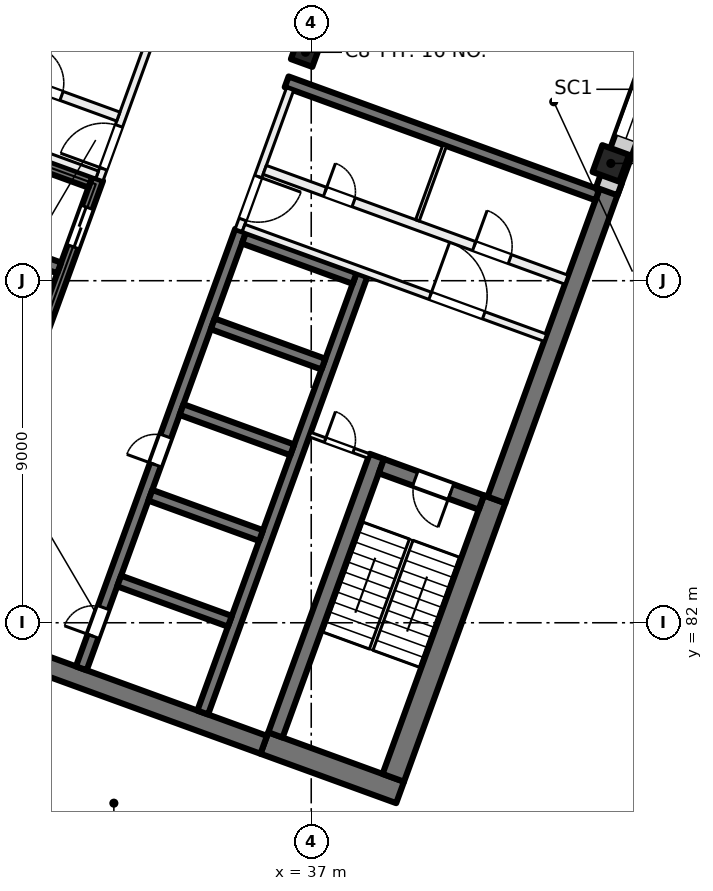
"""IFC4 building model, lengths in metres.
Left out: names, types, materials, properties, quantities, classifications, styles, units other than length and angle.
Written with IfcOpenShell. Run it as: python <this file> out.ifc"""

import sys

from ifc_helpers import new_model, si_unit, direction, frame, frame_2d, origin, origin_2d, place, context, subcontext, project, spatial, rectangle, extrude, element, fill, save


model = new_model("IFC4")
c1 = context("Model", 3, precision=1e-05, world=origin(), true_north=direction((0.0, 1.0)))
c2 = subcontext(c1, "Body", "Model", "MODEL_VIEW")
j1 = project(units=[si_unit("LENGTHUNIT", "METRE"), si_unit("PLANEANGLEUNIT", "RADIAN")], contexts=[c1])
p1 = place(None, origin())
s1 = spatial("IfcSite", under=j1, at=p1, CompositionType="ELEMENT")
p2 = place(p1, origin())
s2 = spatial("IfcBuilding", under=s1, at=p2, CompositionType="ELEMENT")
p3 = place(p2, frame((0.0, 0.0, 188.0)))
s3 = spatial("IfcBuildingStorey", under=s2, at=p3, CompositionType="ELEMENT", Elevation=188.0)
p4 = place(p3, frame((36.849, 97.011, 0.0), z_axis=(0.0, 0.0, 1.0), x_axis=(-0.342020143326, -0.939692620786, 0.0)))
e1 = element("IfcColumn", 1, at=p4, inside=s3, PredefinedType="COLUMN", context=c2, shape_type="SweptSolid", body=[
    extrude(rectangle(XDim=0.6, YDim=0.6, at=origin_2d()), origin(), (0.0, 0.0, 1.0), 4.0),
])
p5 = place(p3, frame((44.884, 94.087, 0.0), z_axis=(0.0, 0.0, 1.0), x_axis=(-0.342020143326, -0.939692620786, 0.0)))
e2 = element("IfcColumn", 2, at=p5, inside=s3, PredefinedType="COLUMN", context=c2, shape_type="SweptSolid", body=[
    extrude(rectangle(XDim=0.75, YDim=0.75, at=origin_2d()), origin(), (0.0, 0.0, 1.0), 4.0),
])
p6 = place(p3, frame((39.338, 77.535, 0.0), z_axis=(0.0, 0.0, 1.0), x_axis=(-0.939701471648, 0.341995824804, 0.0)))
e3 = element("IfcWall", 3, at=p6, inside=s3, PredefinedType="SHEAR", context=c2, shape_type="SweptSolid", body=[
    extrude(rectangle(XDim=3.8, YDim=0.6, at=frame_2d((1.9, 0.0))), origin(), (0.0, 0.0, 1.0), 4.0),
])
p7 = place(p3, frame((35.75, 78.788, 0.0), z_axis=(0.0, 0.0, 1.0), x_axis=(-0.939692894512, 0.342019391267, 0.0)))
e4 = element("IfcWall", 4, at=p7, inside=s3, PredefinedType="SHEAR", context=c2, shape_type="SweptSolid", body=[
    extrude(rectangle(XDim=14.4, YDim=0.5, at=frame_2d((7.2, 0.0))), origin(), (0.0, 0.0, 1.0), 4.0),
])
p8 = place(p3, frame((39.159, 77.92, 0.0), z_axis=(0.0, 0.0, 1.0), x_axis=(0.342016982193, 0.939693771338, 0.0)))
e5 = element("IfcWall", 5, at=p8, inside=s3, PredefinedType="SHEAR", context=c2, shape_type="SweptSolid", body=[
    extrude(rectangle(XDim=7.8, YDim=0.6, at=frame_2d((3.9, 0.0))), origin(), (0.0, 0.0, 1.0), 4.0),
])
p9 = place(p3, frame((41.874, 85.232, 0.0), z_axis=(0.0, 0.0, 1.0), x_axis=(0.342020437038, 0.939692513883, 0.0)))
e6 = element("IfcWall", 6, at=p9, inside=s3, PredefinedType="SHEAR", context=c2, shape_type="SweptSolid", body=[
    extrude(rectangle(XDim=8.975, YDim=0.5, at=frame_2d((4.487, 0.0))), origin(), (0.0, 0.0, 1.0), 4.0),
])
p10 = place(p3, frame((36.058, 79.048, 0.0), z_axis=(0.0, 0.0, 1.0), x_axis=(0.342016982193, 0.939693771338, 0.0)))
e7 = element("IfcWall", 7, at=p10, inside=s3, PredefinedType="SHEAR", context=c2, shape_type="SweptSolid", body=[
    extrude(rectangle(XDim=7.8, YDim=0.4, at=frame_2d((3.9, 0.0))), origin(), (0.0, 0.0, 1.0), 4.0),
])
p11 = place(p3, frame((41.476, 85.164, 0.0), z_axis=(0.0, 0.0, 1.0), x_axis=(-0.939678810556, 0.342058084236, 0.0)))
e8 = element("IfcWall", 8, at=p11, inside=s3, PredefinedType="SHEAR", context=c2, shape_type="SweptSolid", body=[
    extrude(rectangle(XDim=2.8, YDim=0.4, at=frame_2d((1.4, 0.0))), origin(), (0.0, 0.0, 1.0), 4.0),
])
p12 = place(p11, frame((0.85, 0.0, 0.0)))
e9 = element("IfcOpeningElement", 9, at=p12, cuts=e8, PredefinedType="OPENING", context=c2, shape_type="SweptSolid", body=[
    extrude(rectangle(XDim=1.0, YDim=2.1, at=frame_2d((0.5, 1.05))), frame((0.0, 0.21, 0.0), z_axis=(0.0, -1.0, 0.0), x_axis=(1.0, 0.0, 0.0)), (0.0, 0.0, 1.0), 0.42),
])
p13 = place(p3, frame((30.949, 80.801, 0.0), z_axis=(0.0, 0.0, 1.0), x_axis=(0.342016684409, 0.939693879721, 0.0)))
e10 = element("IfcWall", 10, at=p13, inside=s3, PredefinedType="SHEAR", context=c2, shape_type="SweptSolid", body=[
    extrude(rectangle(XDim=12.25, YDim=0.3, at=frame_2d((6.125, 0.0))), origin(), (0.0, 0.0, 1.0), 4.0),
])
p14 = place(p13, frame((0.9, 0.0, 0.0)))
e11 = element("IfcOpeningElement", 11, at=p14, cuts=e10, PredefinedType="OPENING", context=c2, shape_type="SweptSolid", body=[
    extrude(rectangle(XDim=0.8, YDim=2.1, at=frame_2d((0.4, 1.05))), frame((0.0, 0.16, 0.0), z_axis=(0.0, -1.0, 0.0), x_axis=(1.0, 0.0, 0.0)), (0.0, 0.0, 1.0), 0.32),
])
p15 = place(p13, frame((5.7, 0.0, 0.0)))
e12 = element("IfcOpeningElement", 12, at=p15, cuts=e10, PredefinedType="OPENING", context=c2, shape_type="SweptSolid", body=[
    extrude(rectangle(XDim=0.8, YDim=2.1, at=frame_2d((0.4, 1.05))), frame((0.0, 0.16, 0.0), z_axis=(0.0, -1.0, 0.0), x_axis=(1.0, 0.0, 0.0)), (0.0, 0.0, 1.0), 0.32),
])
p16 = place(p3, frame((34.144, 79.638, 0.0), z_axis=(0.0, 0.0, 1.0), x_axis=(0.342016684409, 0.939693879721, 0.0)))
e13 = element("IfcWall", 13, at=p16, inside=s3, PredefinedType="SHEAR", context=c2, shape_type="SweptSolid", body=[
    extrude(rectangle(XDim=12.25, YDim=0.3, at=frame_2d((6.125, 0.0))), origin(), (0.0, 0.0, 1.0), 4.0),
])
p17 = place(p3, frame((34.858, 82.039, 0.0), z_axis=(0.0, 0.0, 1.0), x_axis=(-0.939689908313, 0.342027595692, 0.0)))
e14 = element("IfcWall", 14, at=p17, inside=s3, PredefinedType="SHEAR", context=c2, shape_type="SweptSolid", body=[
    extrude(rectangle(XDim=3.1, YDim=0.3, at=frame_2d((1.55, 0.0))), origin(), (0.0, 0.0, 1.0), 4.0),
])
p18 = place(p3, frame((35.679, 84.294, 0.0), z_axis=(0.0, 0.0, 1.0), x_axis=(-0.939706007505, 0.341983361377, 0.0)))
e15 = element("IfcWall", 15, at=p18, inside=s3, PredefinedType="SHEAR", context=c2, shape_type="SweptSolid", body=[
    extrude(rectangle(XDim=3.1, YDim=0.3, at=frame_2d((1.55, 0.0))), origin(), (0.0, 0.0, 1.0), 4.0),
])
for number, where, z_axis, x_axis in (
    (16, (36.5, 86.549, 0.0), (0.0, 0.0, 1.0), (-0.94, 0.342, 0.0)),
    (17, (37.321, 88.805, 0.0), (0.0, 0.0, 1.0), (-0.94, 0.342, 0.0)),
    (18, (38.142, 91.06, 0.0), (0.0, 0.0, 1.0), (-0.94, 0.342, 0.0)),
):
    element("IfcWall", number, at=place(p3, frame(where, z_axis=z_axis, x_axis=x_axis)), inside=s3, PredefinedType="SHEAR", context=c2, shape_type="SweptSolid", body=[
        extrude(rectangle(XDim=3.1, YDim=0.3, at=frame_2d((1.55, 0.0))), origin(), (0.0, 0.0, 1.0), 4.0),
    ])
p19 = place(p3, frame((27.191, 82.169, 0.0), z_axis=(0.0, 0.0, 1.0), x_axis=(0.342016684409, 0.939693879721, 0.0)))
e19 = element("IfcWall", 19, at=p19, inside=s3, PredefinedType="SHEAR", context=c2, shape_type="SweptSolid", body=[
    extrude(rectangle(XDim=12.25, YDim=0.3, at=frame_2d((6.125, 0.0))), origin(), (0.0, 0.0, 1.0), 4.0),
])
p20 = place(p19, frame((0.75, 0.0, 0.0)))
e20 = element("IfcOpeningElement", 20, at=p20, cuts=e19, PredefinedType="OPENING", context=c2, shape_type="SweptSolid", body=[
    extrude(rectangle(XDim=1.1, YDim=2.1, at=frame_2d((0.55, 1.05))), frame((0.0, 0.16, 0.0), z_axis=(0.0, -1.0, 0.0), x_axis=(1.0, 0.0, 0.0)), (0.0, 0.0, 1.0), 0.32),
])
p21 = place(p19, frame((3.15, 0.0, 0.0)))
e21 = element("IfcOpeningElement", 21, at=p21, cuts=e19, PredefinedType="OPENING", context=c2, shape_type="SweptSolid", body=[
    extrude(rectangle(XDim=1.1, YDim=2.1, at=frame_2d((0.55, 1.05))), frame((0.0, 0.16, 0.0), z_axis=(0.0, -1.0, 0.0), x_axis=(1.0, 0.0, 0.0)), (0.0, 0.0, 1.0), 0.32),
])
p22 = place(p19, frame((5.55, 0.0, 0.0)))
e22 = element("IfcOpeningElement", 22, at=p22, cuts=e19, PredefinedType="OPENING", context=c2, shape_type="SweptSolid", body=[
    extrude(rectangle(XDim=1.1, YDim=2.1, at=frame_2d((0.55, 1.05))), frame((0.0, 0.16, 0.0), z_axis=(0.0, -1.0, 0.0), x_axis=(1.0, 0.0, 0.0)), (0.0, 0.0, 1.0), 0.32),
])
p23 = place(p19, frame((10.35, 0.0, 0.0)))
e23 = element("IfcOpeningElement", 23, at=p23, cuts=e19, PredefinedType="OPENING", context=c2, shape_type="SweptSolid", body=[
    extrude(rectangle(XDim=1.1, YDim=2.1, at=frame_2d((0.55, 1.05))), frame((0.0, 0.16, 0.0), z_axis=(0.0, -1.0, 0.0), x_axis=(1.0, 0.0, 0.0)), (0.0, 0.0, 1.0), 0.32),
])
for number, where, z_axis, x_axis in (
    (24, (30.367, 91.336, 0.0), (0.0, 0.0, 1.0), (-0.94, 0.342, 0.0)),
    (25, (31.188, 93.591, 0.0), (0.0, 0.0, 1.0), (-0.94, 0.342, 0.0)),
):
    element("IfcWall", number, at=place(p3, frame(where, z_axis=z_axis, x_axis=x_axis)), inside=s3, PredefinedType="SHEAR", context=c2, shape_type="SweptSolid", body=[
        extrude(rectangle(XDim=3.1, YDim=0.3, at=frame_2d((1.55, 0.0))), origin(), (0.0, 0.0, 1.0), 4.0),
    ])
p24 = place(p3, frame((44.529, 93.258, 0.0), z_axis=(0.0, 0.0, 1.0), x_axis=(-0.9396917844, 0.342022441267, 0.0)))
e26 = element("IfcWall", 26, at=p24, inside=s3, PredefinedType="SHEAR", context=c2, shape_type="SweptSolid", body=[
    extrude(rectangle(XDim=8.7, YDim=0.3, at=frame_2d((4.35, 0.0))), origin(), (0.0, 0.0, 1.0), 4.0),
])
p25 = place(p3, frame((51.668, 112.289, 0.0), z_axis=(0.0, 0.0, 1.0), x_axis=(-0.342020240414, -0.939692585449, 0.0)))
e27 = element("IfcWall", 27, at=p25, inside=s3, PredefinedType="SOLIDWALL", context=c2, shape_type="SweptSolid", body=[
    extrude(rectangle(XDim=20.155, YDim=0.6, at=frame_2d((10.077, 0.0))), origin(), (0.0, 0.0, 1.0), 3.625),
])
p26 = place(p25, frame((2.175, 0.0, 0.9)))
e28 = element("IfcOpeningElement", 28, at=p26, cuts=e27, PredefinedType="OPENING", context=c2, shape_type="SweptSolid", body=[
    extrude(rectangle(XDim=3.0, YDim=2.4, at=frame_2d((1.5, 1.2))), frame((0.0, 0.31, 0.0), z_axis=(0.0, -1.0, 0.0), x_axis=(1.0, 0.0, 0.0)), (0.0, 0.0, 1.0), 0.62),
])
p27 = place(p25, frame((6.675, 0.0, 0.9)))
e29 = element("IfcOpeningElement", 29, at=p27, cuts=e27, PredefinedType="OPENING", context=c2, shape_type="SweptSolid", body=[
    extrude(rectangle(XDim=3.0, YDim=2.4, at=frame_2d((1.5, 1.2))), frame((0.0, 0.31, 0.0), z_axis=(0.0, -1.0, 0.0), x_axis=(1.0, 0.0, 0.0)), (0.0, 0.0, 1.0), 0.62),
])
p28 = place(p25, frame((11.175, 0.0, 0.9)))
e30 = element("IfcOpeningElement", 30, at=p28, cuts=e27, PredefinedType="OPENING", context=c2, shape_type="SweptSolid", body=[
    extrude(rectangle(XDim=3.0, YDim=2.4, at=frame_2d((1.5, 1.2))), frame((0.0, 0.31, 0.0), z_axis=(0.0, -1.0, 0.0), x_axis=(1.0, 0.0, 0.0)), (0.0, 0.0, 1.0), 0.62),
])
p29 = place(p25, frame((15.675, 0.0, 0.9)))
e31 = element("IfcOpeningElement", 31, at=p29, cuts=e27, PredefinedType="OPENING", context=c2, shape_type="SweptSolid", body=[
    extrude(rectangle(XDim=3.0, YDim=2.4, at=frame_2d((1.5, 1.2))), frame((0.0, 0.31, 0.0), z_axis=(0.0, -1.0, 0.0), x_axis=(1.0, 0.0, 0.0)), (0.0, 0.0, 1.0), 0.62),
])
p30 = place(p3, frame((31.427, 93.663, 0.0), z_axis=(0.0, 0.0, 1.0), x_axis=(0.342030870568, 0.93968871632, 0.0)))
e32 = element("IfcWall", 32, at=p30, inside=s3, PredefinedType="PARTITIONING", context=c2, shape_type="SweptSolid", body=[
    extrude(rectangle(XDim=3.95, YDim=0.2, at=frame_2d((1.975, 0.0))), origin(), (0.0, 0.0, 1.0), 3.625),
])
p31 = place(p30, frame((0.3, 0.0, 0.0)))
e33 = element("IfcOpeningElement", 33, at=p31, cuts=e32, PredefinedType="OPENING", context=c2, shape_type="SweptSolid", body=[
    extrude(rectangle(XDim=1.2, YDim=2.1, at=frame_2d((0.6, 1.05))), frame((0.0, 0.11, 0.0), z_axis=(0.0, -1.0, 0.0), x_axis=(1.0, 0.0, 0.0)), (0.0, 0.0, 1.0), 0.22),
])
p32 = place(p3, frame((23.427, 96.682, 0.0), z_axis=(0.0, 0.0, 1.0), x_axis=(0.939690465531, -0.342026064782, 0.0)))
e34 = element("IfcWall", 34, at=p32, inside=s3, PredefinedType="PARTITIONING", context=c2, shape_type="SweptSolid", body=[
    extrude(rectangle(XDim=8.45, YDim=0.2, at=frame_2d((4.225, 0.0))), origin(), (0.0, 0.0, 1.0), 3.625),
])
p33 = place(p32, frame((1.725, 0.0, 0.0)))
e35 = element("IfcOpeningElement", 35, at=p33, cuts=e34, PredefinedType="OPENING", context=c2, shape_type="SweptSolid", body=[
    extrude(rectangle(XDim=1.5, YDim=2.1, at=frame_2d((0.75, 1.05))), frame((0.0, 0.11, 0.0), z_axis=(0.0, -1.0, 0.0), x_axis=(1.0, 0.0, 0.0)), (0.0, 0.0, 1.0), 0.22),
])
p34 = place(p3, frame((23.983, 98.208, 0.0), z_axis=(0.0, 0.0, 1.0), x_axis=(0.939699751196, -0.342000552051, 0.0)))
e36 = element("IfcWall", 36, at=p34, inside=s3, PredefinedType="PARTITIONING", context=c2, shape_type="SweptSolid", body=[
    extrude(rectangle(XDim=8.45, YDim=0.25, at=frame_2d((4.225, 0.0))), origin(), (0.0, 0.0, 1.0), 3.625),
])
p35 = place(p34, frame((5.86, 0.0, 0.0)))
e37 = element("IfcOpeningElement", 37, at=p35, cuts=e36, PredefinedType="OPENING", context=c2, shape_type="SweptSolid", body=[
    extrude(rectangle(XDim=1.0, YDim=2.1, at=frame_2d((0.5, 1.05))), frame((0.0, 0.135, 0.0), z_axis=(0.0, -1.0, 0.0), x_axis=(1.0, 0.0, 0.0)), (0.0, 0.0, 1.0), 0.27),
])
p36 = place(p34, frame((1.685, 0.0, 0.0)))
e38 = element("IfcOpeningElement", 38, at=p36, cuts=e36, PredefinedType="OPENING", context=c2, shape_type="SweptSolid", body=[
    extrude(rectangle(XDim=0.8, YDim=2.1, at=frame_2d((0.4, 1.05))), frame((0.0, 0.135, 0.0), z_axis=(0.0, -1.0, 0.0), x_axis=(1.0, 0.0, 0.0)), (0.0, 0.0, 1.0), 0.27),
])
p37 = place(p3, frame((36.443, 96.041, 0.0), z_axis=(0.0, 0.0, 1.0), x_axis=(-0.341996156931, -0.939701350773, 0.0)))
e39 = element("IfcWall", 39, at=p37, inside=s3, PredefinedType="PARTITIONING", context=c2, shape_type="SweptSolid", body=[
    extrude(rectangle(XDim=3.95, YDim=0.2, at=frame_2d((1.975, 0.0))), origin(), (0.0, 0.0, 1.0), 3.625),
])
p38 = place(p37, frame((2.45, 0.0, 0.0)))
e40 = element("IfcOpeningElement", 40, at=p38, cuts=e39, PredefinedType="OPENING", context=c2, shape_type="SweptSolid", body=[
    extrude(rectangle(XDim=1.2, YDim=2.1, at=frame_2d((0.6, 1.05))), frame((0.0, 0.11, 0.0), z_axis=(0.0, -1.0, 0.0), x_axis=(1.0, 0.0, 0.0)), (0.0, 0.0, 1.0), 0.22),
])
p39 = place(p3, frame((35.22, 92.389, 0.0), z_axis=(0.0, 0.0, 1.0), x_axis=(0.939690465531, -0.342026064782, 0.0)))
e41 = element("IfcWall", 41, at=p39, inside=s3, PredefinedType="PARTITIONING", context=c2, shape_type="SweptSolid", body=[
    extrude(rectangle(XDim=8.45, YDim=0.2, at=frame_2d((4.225, 0.0))), origin(), (0.0, 0.0, 1.0), 3.625),
])
p40 = place(p39, frame((5.225, 0.0, 0.0)))
e42 = element("IfcOpeningElement", 42, at=p40, cuts=e41, PredefinedType="OPENING", context=c2, shape_type="SweptSolid", body=[
    extrude(rectangle(XDim=1.5, YDim=2.1, at=frame_2d((0.75, 1.05))), frame((0.0, 0.11, 0.0), z_axis=(0.0, -1.0, 0.0), x_axis=(1.0, 0.0, 0.0)), (0.0, 0.0, 1.0), 0.22),
])
p41 = place(p3, frame((35.776, 93.916, 0.0), z_axis=(0.0, 0.0, 1.0), x_axis=(0.939690465531, -0.342026064782, 0.0)))
e43 = element("IfcWall", 43, at=p41, inside=s3, PredefinedType="PARTITIONING", context=c2, shape_type="SweptSolid", body=[
    extrude(rectangle(XDim=8.45, YDim=0.25, at=frame_2d((4.225, 0.0))), origin(), (0.0, 0.0, 1.0), 3.625),
])
p42 = place(p41, frame((1.69, 0.0, 0.0)))
e44 = element("IfcOpeningElement", 44, at=p42, cuts=e43, PredefinedType="OPENING", context=c2, shape_type="SweptSolid", body=[
    extrude(rectangle(XDim=0.8, YDim=2.1, at=frame_2d((0.4, 1.05))), frame((0.0, 0.135, 0.0), z_axis=(0.0, -1.0, 0.0), x_axis=(1.0, 0.0, 0.0)), (0.0, 0.0, 1.0), 0.27),
])
p43 = place(p41, frame((5.865, 0.0, 0.0)))
e45 = element("IfcOpeningElement", 45, at=p43, cuts=e43, PredefinedType="OPENING", context=c2, shape_type="SweptSolid", body=[
    extrude(rectangle(XDim=1.0, YDim=2.1, at=frame_2d((0.5, 1.05))), frame((0.0, 0.135, 0.0), z_axis=(0.0, -1.0, 0.0), x_axis=(1.0, 0.0, 0.0)), (0.0, 0.0, 1.0), 0.27),
])
p44 = place(p3, frame((36.966, 86.952, 0.0), z_axis=(0.0, 0.0, 1.0), x_axis=(0.939672407396, -0.342075674051, 0.0)))
e46 = element("IfcWall", 46, at=p44, inside=s3, PredefinedType="PARTITIONING", context=c2, shape_type="SweptSolid", body=[
    extrude(rectangle(XDim=1.65, YDim=0.125, at=frame_2d((0.825, 0.0))), origin(), (0.0, 0.0, 1.0), 3.625),
])
p45 = place(p44, frame((0.425, 0.0, 0.0)))
e47 = element("IfcOpeningElement", 47, at=p45, cuts=e46, PredefinedType="OPENING", context=c2, shape_type="SweptSolid", body=[
    extrude(rectangle(XDim=0.8, YDim=2.1, at=frame_2d((0.4, 1.05))), frame((0.0, 0.073, 0.0), z_axis=(0.0, -1.0, 0.0), x_axis=(1.0, 0.0, 0.0)), (0.0, 0.0, 1.0), 0.145),
])
p46 = place(p3, frame((40.512, 94.56, 0.0), z_axis=(0.0, 0.0, 1.0), x_axis=(-0.342023078919, -0.939691552312, 0.0)))
e48 = element("IfcWall", 48, at=p46, inside=s3, PredefinedType="PARTITIONING", context=c2, shape_type="SweptSolid", body=[
    extrude(rectangle(XDim=2.1, YDim=0.1, at=frame_2d((1.05, 0.0))), origin(), (0.0, 0.0, 1.0), 3.625),
])
p47 = place(p29, origin())
e49 = element("IfcWindow", 49, at=p47, inside=s3, PartitioningType="SINGLE_PANEL", PredefinedType="WINDOW", context=c2, shape_type="SweptSolid", body=[
    extrude(rectangle(XDim=3.0, YDim=2.4, at=frame_2d((1.5, 1.2))), frame((0.0, 0.03, 0.0), z_axis=(0.0, -1.0, 0.0), x_axis=(1.0, 0.0, 0.0)), (0.0, 0.0, 1.0), 0.06),
])
fill(e31, e49)
p48 = place(p23, origin())
e50 = element("IfcDoor", 50, at=p48, inside=s3, OperationType="DOUBLE_DOOR_SLIDING", PredefinedType="DOOR", context=c2, shape_type="SweptSolid", body=[
    extrude(rectangle(XDim=1.1, YDim=2.1, at=frame_2d((0.55, 1.05))), frame((0.0, 0.025, 0.0), z_axis=(0.0, -1.0, 0.0), x_axis=(1.0, 0.0, 0.0)), (0.0, 0.0, 1.0), 0.05),
])
fill(e23, e50)
p49 = place(p14, origin())
e51 = element("IfcDoor", 51, at=p49, inside=s3, OperationType="SINGLE_SWING_LEFT", PredefinedType="DOOR", context=c2, shape_type="SweptSolid", body=[
    extrude(rectangle(XDim=0.8, YDim=2.1, at=frame_2d((0.4, 1.05))), frame((0.0, 0.025, 0.0), z_axis=(0.0, -1.0, 0.0), x_axis=(1.0, 0.0, 0.0)), (0.0, 0.0, 1.0), 0.05),
])
fill(e11, e51)
p50 = place(p15, origin())
e52 = element("IfcDoor", 52, at=p50, inside=s3, OperationType="SINGLE_SWING_RIGHT", PredefinedType="DOOR", context=c2, shape_type="SweptSolid", body=[
    extrude(rectangle(XDim=0.8, YDim=2.1, at=frame_2d((0.4, 1.05))), frame((0.0, 0.025, 0.0), z_axis=(0.0, -1.0, 0.0), x_axis=(1.0, 0.0, 0.0)), (0.0, 0.0, 1.0), 0.05),
])
fill(e12, e52)
p51 = place(p31, origin())
e53 = element("IfcDoor", 53, at=p51, inside=s3, OperationType="DOUBLE_DOOR_SINGLE_SWING", PredefinedType="DOOR", context=c2, shape_type="SweptSolid", body=[
    extrude(rectangle(XDim=1.2, YDim=2.1, at=frame_2d((0.6, 1.05))), frame((0.0, 0.025, 0.0), z_axis=(0.0, -1.0, 0.0), x_axis=(1.0, 0.0, 0.0)), (0.0, 0.0, 1.0), 0.05),
])
fill(e33, e53)
p52 = place(p35, origin())
e54 = element("IfcDoor", 54, at=p52, inside=s3, OperationType="SINGLE_SWING_LEFT", PredefinedType="DOOR", context=c2, shape_type="SweptSolid", body=[
    extrude(rectangle(XDim=1.0, YDim=2.1, at=frame_2d((0.5, 1.05))), frame((0.0, 0.025, 0.0), z_axis=(0.0, -1.0, 0.0), x_axis=(1.0, 0.0, 0.0)), (0.0, 0.0, 1.0), 0.05),
])
fill(e37, e54)
p53 = place(p38, origin())
e55 = element("IfcDoor", 55, at=p53, inside=s3, OperationType="DOUBLE_DOOR_SINGLE_SWING", PredefinedType="DOOR", context=c2, shape_type="SweptSolid", body=[
    extrude(rectangle(XDim=1.2, YDim=2.1, at=frame_2d((0.6, 1.05))), frame((0.0, 0.025, 0.0), z_axis=(0.0, -1.0, 0.0), x_axis=(1.0, 0.0, 0.0)), (0.0, 0.0, 1.0), 0.05),
])
fill(e40, e55)
p54 = place(p40, origin())
e56 = element("IfcDoor", 56, at=p54, inside=s3, OperationType="DOUBLE_DOOR_SINGLE_SWING", PredefinedType="DOOR", context=c2, shape_type="SweptSolid", body=[
    extrude(rectangle(XDim=1.5, YDim=2.1, at=frame_2d((0.75, 1.05))), frame((0.0, 0.025, 0.0), z_axis=(0.0, -1.0, 0.0), x_axis=(1.0, 0.0, 0.0)), (0.0, 0.0, 1.0), 0.05),
])
fill(e42, e56)
p55 = place(p12, origin())
e57 = element("IfcDoor", 57, at=p55, inside=s3, OperationType="SINGLE_SWING_RIGHT", PredefinedType="DOOR", context=c2, shape_type="SweptSolid", body=[
    extrude(rectangle(XDim=1.0, YDim=2.1, at=frame_2d((0.5, 1.05))), frame((0.0, 0.025, 0.0), z_axis=(0.0, -1.0, 0.0), x_axis=(1.0, 0.0, 0.0)), (0.0, 0.0, 1.0), 0.05),
])
fill(e9, e57)
p56 = place(p45, origin())
e58 = element("IfcDoor", 58, at=p56, inside=s3, OperationType="SINGLE_SWING_LEFT", PredefinedType="DOOR", context=c2, shape_type="SweptSolid", body=[
    extrude(rectangle(XDim=0.8, YDim=2.1, at=frame_2d((0.4, 1.05))), frame((0.0, 0.025, 0.0), z_axis=(0.0, -1.0, 0.0), x_axis=(1.0, 0.0, 0.0)), (0.0, 0.0, 1.0), 0.05),
])
fill(e47, e58)
p57 = place(p42, origin())
e59 = element("IfcDoor", 59, at=p57, inside=s3, OperationType="SINGLE_SWING_RIGHT", PredefinedType="DOOR", context=c2, shape_type="SweptSolid", body=[
    extrude(rectangle(XDim=0.8, YDim=2.1, at=frame_2d((0.4, 1.05))), frame((0.0, 0.025, 0.0), z_axis=(0.0, -1.0, 0.0), x_axis=(1.0, 0.0, 0.0)), (0.0, 0.0, 1.0), 0.05),
])
fill(e44, e59)
p58 = place(p43, origin())
e60 = element("IfcDoor", 60, at=p58, inside=s3, OperationType="SINGLE_SWING_LEFT", PredefinedType="DOOR", context=c2, shape_type="SweptSolid", body=[
    extrude(rectangle(XDim=1.0, YDim=2.1, at=frame_2d((0.5, 1.05))), frame((0.0, 0.025, 0.0), z_axis=(0.0, -1.0, 0.0), x_axis=(1.0, 0.0, 0.0)), (0.0, 0.0, 1.0), 0.05),
])
fill(e45, e60)
save(model, sys.argv[1])
